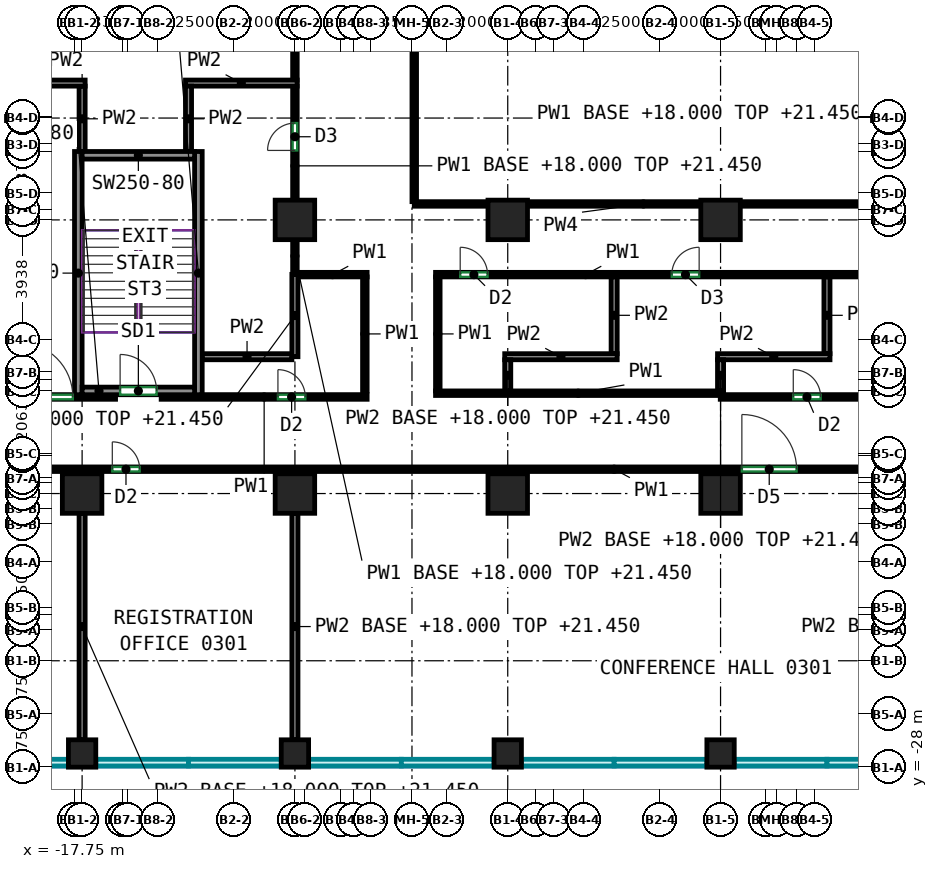
"""IFC4 building model, lengths in metres.
Left out: names, types, materials, properties, quantities, classifications, styles, units other than length and angle.
Written with IfcOpenShell. Run it as: python <this file> out.ifc"""

import sys

from ifc_helpers import new_model, si_unit, direction, frame, frame_2d, origin, origin_2d, place, context, subcontext, project, spatial, rectangle, extrude, source, transform, mapped, element, fill, save


model = new_model("IFC4")
c1 = context("Model", 3, precision=1e-05, world=origin(), true_north=direction((0.0, 1.0)))
c2 = subcontext(c1, "Body", "Model", "MODEL_VIEW")
j1 = project(units=[si_unit("LENGTHUNIT", "METRE"), si_unit("PLANEANGLEUNIT", "RADIAN")], contexts=[c1])
p1 = place(None, origin())
s1 = spatial("IfcSite", under=j1, at=p1, CompositionType="ELEMENT")
p2 = place(p1, origin())
s2 = spatial("IfcBuilding", under=s1, at=p2, CompositionType="ELEMENT")
p3 = place(p2, frame((0.0, 0.0, 18.0)))
s3 = spatial("IfcBuildingStorey", under=s2, at=p3, CompositionType="ELEMENT", Elevation=18.0)
m1 = source(origin(), c2, "Body", "SweptSolid", [
    extrude(rectangle(XDim=0.9, YDim=0.9, at=origin_2d()), origin(), (0.0, 0.0, 1.0), 4.1),
])
p4 = place(p3, frame((-17.5, -27.55, 0.0), z_axis=(0.0, 0.0, 1.0), x_axis=(1.0, 0.0, 0.0)))
e1 = element("IfcColumn", 1, at=p4, inside=s3, PredefinedType="COLUMN", context=c2, shape_type="MappedRepresentation", body=[
    mapped(m1, transform((0.0, 0.0, 0.0))),
])
m2 = source(origin(), c2, "Body", "SweptSolid", [
    extrude(rectangle(XDim=1.3, YDim=1.3, at=origin_2d()), origin(), (0.0, 0.0, 1.0), 4.1),
])
p5 = place(p3, frame((-17.5, -19.0, 0.0), z_axis=(0.0, 0.0, 1.0), x_axis=(1.0, 0.0, 0.0)))
e2 = element("IfcColumn", 2, at=p5, inside=s3, PredefinedType="COLUMN", context=c2, shape_type="MappedRepresentation", body=[
    mapped(m2, transform((0.0, 0.0, 0.0))),
])
p6 = place(p3, frame((-10.5, -27.55, 0.0), z_axis=(0.0, 0.0, 1.0), x_axis=(1.0, 0.0, 0.0)))
e3 = element("IfcColumn", 3, at=p6, inside=s3, PredefinedType="COLUMN", context=c2, shape_type="MappedRepresentation", body=[
    mapped(m1, transform((0.0, 0.0, 0.0))),
])
for number, where, z_axis, x_axis in (
    (4, (-10.5, -19.0, 0.0), (0.0, 0.0, 1.0), (1.0, 0.0, 0.0)),
    (5, (-10.5, -10.0, 0.0), (0.0, 0.0, 1.0), (1.0, 0.0, 0.0)),
):
    element("IfcColumn", number, at=place(p3, frame(where, z_axis=z_axis, x_axis=x_axis)), inside=s3, PredefinedType="COLUMN", context=c2, shape_type="MappedRepresentation", body=[
        mapped(m2, transform((0.0, 0.0, 0.0))),
    ])
p7 = place(p3, frame((-3.5, -27.55, 0.0), z_axis=(0.0, 0.0, 1.0), x_axis=(1.0, 0.0, 0.0)))
e6 = element("IfcColumn", 6, at=p7, inside=s3, PredefinedType="COLUMN", context=c2, shape_type="MappedRepresentation", body=[
    mapped(m1, transform((0.0, 0.0, 0.0))),
])
for number, where, z_axis, x_axis in (
    (7, (-3.5, -19.0, 0.0), (0.0, 0.0, 1.0), (1.0, 0.0, 0.0)),
    (8, (-3.5, -10.0, 0.0), (0.0, 0.0, 1.0), (1.0, 0.0, 0.0)),
):
    element("IfcColumn", number, at=place(p3, frame(where, z_axis=z_axis, x_axis=x_axis)), inside=s3, PredefinedType="COLUMN", context=c2, shape_type="MappedRepresentation", body=[
        mapped(m2, transform((0.0, 0.0, 0.0))),
    ])
p8 = place(p3, frame((3.5, -27.55, 0.0), z_axis=(0.0, 0.0, 1.0), x_axis=(1.0, 0.0, 0.0)))
e9 = element("IfcColumn", 9, at=p8, inside=s3, PredefinedType="COLUMN", context=c2, shape_type="MappedRepresentation", body=[
    mapped(m1, transform((0.0, 0.0, 0.0))),
])
for number, where, z_axis, x_axis in (
    (10, (3.5, -19.0, 0.0), (0.0, 0.0, 1.0), (1.0, 0.0, 0.0)),
    (11, (3.5, -10.0, 0.0), (0.0, 0.0, 1.0), (1.0, 0.0, 0.0)),
):
    element("IfcColumn", number, at=place(p3, frame(where, z_axis=z_axis, x_axis=x_axis)), inside=s3, PredefinedType="COLUMN", context=c2, shape_type="MappedRepresentation", body=[
        mapped(m2, transform((0.0, 0.0, 0.0))),
    ])
m3 = source(origin(), c2, "Body", "SweptSolid", [
    extrude(rectangle(XDim=8.0, YDim=0.25, at=frame_2d((4.0, 0.0))), origin(), (0.0, 0.0, 1.0), 4.1),
])
for number, where, z_axis, x_axis in (
    (12, (-17.625, -15.75, 0.0), (0.0, 0.0, 1.0), (0.0, 1.0, 0.0)),
    (13, (-13.675, -15.75, 0.0), (0.0, 0.0, 1.0), (0.0, 1.0, 0.0)),
):
    element("IfcWall", number, at=place(p3, frame(where, z_axis=z_axis, x_axis=x_axis)), inside=s3, PredefinedType="SHEAR", context=c2, shape_type="MappedRepresentation", body=[
        mapped(m3, transform((0.0, 0.0, 0.0))),
    ])
m4 = source(origin(), c2, "Body", "SweptSolid", [
    extrude(rectangle(XDim=3.7, YDim=0.25, at=frame_2d((1.85, 0.0))), origin(), (0.0, 0.0, 1.0), 4.1),
])
p9 = place(p3, frame((-17.5, -15.625, 0.0), z_axis=(0.0, 0.0, 1.0), x_axis=(1.0, 0.0, 0.0)))
e14 = element("IfcWall", 14, at=p9, inside=s3, PredefinedType="SHEAR", context=c2, shape_type="MappedRepresentation", body=[
    mapped(m4, transform((0.0, 0.0, 0.0))),
])
p10 = place(p9, frame((1.25, 0.0, 0.0)))
e15 = element("IfcOpeningElement", 15, at=p10, cuts=e14, PredefinedType="OPENING", context=c2, shape_type="SweptSolid", body=[
    extrude(rectangle(XDim=1.2, YDim=2.1, at=frame_2d((0.6, 1.05))), frame((0.0, 0.135, 0.0), z_axis=(0.0, -1.0, 0.0), x_axis=(1.0, 0.0, 0.0)), (0.0, 0.0, 1.0), 0.27),
])
p11 = place(p3, frame((-17.5, -7.875, 0.0), z_axis=(0.0, 0.0, 1.0), x_axis=(1.0, 0.0, 0.0)))
e16 = element("IfcWall", 16, at=p11, inside=s3, PredefinedType="SHEAR", context=c2, shape_type="MappedRepresentation", body=[
    mapped(m4, transform((0.0, 0.0, 0.0))),
])
p12 = place(p3, frame((-10.5, -5.41, 0.0), z_axis=(0.0, 0.0, 1.0), x_axis=(0.0, 1.0, 0.0)))
e17 = element("IfcWall", 17, at=p12, inside=s3, PredefinedType="PARTITIONING", context=c2, shape_type="SweptSolid", body=[
    extrude(rectangle(XDim=3.76, YDim=0.15, at=frame_2d((1.88, 0.0))), origin(), (0.0, 0.0, 1.0), 3.45),
])
p13 = place(p3, frame((-24.325, -18.2, 0.0), z_axis=(0.0, 0.0, 1.0), x_axis=(1.0, 0.0, 0.0)))
e18 = element("IfcWall", 18, at=p13, inside=s3, PredefinedType="PARTITIONING", context=c2, shape_type="SweptSolid", body=[
    extrude(rectangle(XDim=48.65, YDim=0.15, at=frame_2d((24.325, 0.0))), origin(), (0.0, 0.0, 1.0), 4.1),
])
p14 = place(p13, frame((7.818, 0.0, 0.0)))
e19 = element("IfcOpeningElement", 19, at=p14, cuts=e18, PredefinedType="OPENING", context=c2, shape_type="SweptSolid", body=[
    extrude(rectangle(XDim=0.9, YDim=2.1, at=frame_2d((0.45, 1.05))), frame((0.0, 0.085, 0.0), z_axis=(0.0, -1.0, 0.0), x_axis=(1.0, 0.0, 0.0)), (0.0, 0.0, 1.0), 0.17),
])
p15 = place(p13, frame((28.526, 0.0, 0.0)))
e20 = element("IfcOpeningElement", 20, at=p15, cuts=e18, PredefinedType="OPENING", context=c2, shape_type="SweptSolid", body=[
    extrude(rectangle(XDim=1.8, YDim=2.1, at=frame_2d((0.9, 1.05))), frame((0.0, 0.085, 0.0), z_axis=(0.0, -1.0, 0.0), x_axis=(1.0, 0.0, 0.0)), (0.0, 0.0, 1.0), 0.17),
])
p16 = place(p13, frame((44.531, 0.0, 0.0)))
e21 = element("IfcOpeningElement", 21, at=p16, cuts=e18, PredefinedType="OPENING", context=c2, shape_type="SweptSolid", body=[
    extrude(rectangle(XDim=0.9, YDim=2.1, at=frame_2d((0.45, 1.05))), frame((0.0, 0.085, 0.0), z_axis=(0.0, -1.0, 0.0), x_axis=(1.0, 0.0, 0.0)), (0.0, 0.0, 1.0), 0.17),
])
p17 = place(p3, frame((-14.9, -15.825, 0.0), z_axis=(0.0, 0.0, 1.0), x_axis=(1.0, 0.0, 0.0)))
e22 = element("IfcWall", 22, at=p17, inside=s3, PredefinedType="PARTITIONING", context=c2, shape_type="SweptSolid", body=[
    extrude(rectangle(XDim=6.775, YDim=0.15, at=frame_2d((3.387, 0.0))), origin(), (0.0, 0.0, 1.0), 4.1),
])
p18 = place(p17, frame((3.841, 0.0, 0.0)))
e23 = element("IfcOpeningElement", 23, at=p18, cuts=e22, PredefinedType="OPENING", context=c2, shape_type="SweptSolid", body=[
    extrude(rectangle(XDim=0.9, YDim=2.1, at=frame_2d((0.45, 1.05))), frame((0.0, 0.085, 0.0), z_axis=(0.0, -1.0, 0.0), x_axis=(1.0, 0.0, 0.0)), (0.0, 0.0, 1.0), 0.17),
])
p19 = place(p3, frame((-24.325, -15.825, 0.0), z_axis=(0.0, 0.0, 1.0), x_axis=(1.0, 0.0, 0.0)))
e24 = element("IfcWall", 24, at=p19, inside=s3, PredefinedType="PARTITIONING", context=c2, shape_type="SweptSolid", body=[
    extrude(rectangle(XDim=7.925, YDim=0.15, at=frame_2d((3.962, 0.0))), origin(), (0.0, 0.0, 1.0), 4.1),
])
p20 = place(p19, frame((4.72, 0.0, 0.0)))
e25 = element("IfcOpeningElement", 25, at=p20, cuts=e24, PredefinedType="OPENING", context=c2, shape_type="SweptSolid", body=[
    extrude(rectangle(XDim=1.8, YDim=2.1, at=frame_2d((0.9, 1.05))), frame((0.0, 0.085, 0.0), z_axis=(0.0, -1.0, 0.0), x_axis=(1.0, 0.0, 0.0)), (0.0, 0.0, 1.0), 0.17),
])
p21 = place(p3, frame((-10.5, -11.725, 0.0), z_axis=(0.0, 0.0, 1.0), x_axis=(0.0, 1.0, 0.0)))
e26 = element("IfcWall", 26, at=p21, inside=s3, PredefinedType="PARTITIONING", context=c2, shape_type="SweptSolid", body=[
    extrude(rectangle(XDim=1.075, YDim=0.15, at=frame_2d((0.538, 0.0))), origin(), (0.0, 0.0, 1.0), 3.45),
])
p22 = place(p3, frame((-10.5, -9.35, 0.0), z_axis=(0.0, 0.0, 1.0), x_axis=(0.0, 1.0, 0.0)))
e27 = element("IfcWall", 27, at=p22, inside=s3, PredefinedType="PARTITIONING", context=c2, shape_type="SweptSolid", body=[
    extrude(rectangle(XDim=3.76, YDim=0.15, at=frame_2d((1.88, 0.0))), origin(), (0.0, 0.0, 1.0), 3.45),
])
p23 = place(p22, frame((1.635, 0.0, 0.0)))
e28 = element("IfcOpeningElement", 28, at=p23, cuts=e27, PredefinedType="OPENING", context=c2, shape_type="SweptSolid", body=[
    extrude(rectangle(XDim=0.9, YDim=2.1, at=frame_2d((0.45, 1.05))), frame((0.0, 0.085, 0.0), z_axis=(0.0, -1.0, 0.0), x_axis=(1.0, 0.0, 0.0)), (0.0, 0.0, 1.0), 0.17),
])
p24 = place(p3, frame((-8.2, -11.875, 0.0), z_axis=(0.0, 0.0, 1.0), x_axis=(0.0, -1.0, 0.0)))
e29 = element("IfcWall", 29, at=p24, inside=s3, PredefinedType="PARTITIONING", context=c2, shape_type="SweptSolid", body=[
    extrude(rectangle(XDim=3.75, YDim=0.15, at=frame_2d((1.875, 0.0))), origin(), (0.0, 0.0, 1.0), 4.1),
])
p25 = place(p3, frame((-10.401, -11.8, 0.0), z_axis=(0.0, 0.0, 1.0), x_axis=(1.0, 0.0, 0.0)))
e30 = element("IfcWall", 30, at=p25, inside=s3, PredefinedType="PARTITIONING", context=c2, shape_type="SweptSolid", body=[
    extrude(rectangle(XDim=2.276, YDim=0.15, at=frame_2d((1.138, 0.0))), origin(), (0.0, 0.0, 1.0), 4.1),
])
p26 = place(p3, frame((-5.875, -11.8, 0.0), z_axis=(0.0, 0.0, 1.0), x_axis=(1.0, 0.0, 0.0)))
e31 = element("IfcWall", 31, at=p26, inside=s3, PredefinedType="PARTITIONING", context=c2, shape_type="SweptSolid", body=[
    extrude(rectangle(XDim=16.45, YDim=0.15, at=frame_2d((8.225, 0.0))), origin(), (0.0, 0.0, 1.0), 4.1),
])
p27 = place(p26, frame((0.811, 0.0, 0.0)))
e32 = element("IfcOpeningElement", 32, at=p27, cuts=e31, PredefinedType="OPENING", context=c2, shape_type="SweptSolid", body=[
    extrude(rectangle(XDim=0.9, YDim=2.1, at=frame_2d((0.45, 1.05))), frame((0.0, 0.085, 0.0), z_axis=(0.0, -1.0, 0.0), x_axis=(1.0, 0.0, 0.0)), (0.0, 0.0, 1.0), 0.17),
])
p28 = place(p26, frame((7.771, 0.0, 0.0)))
e33 = element("IfcOpeningElement", 33, at=p28, cuts=e31, PredefinedType="OPENING", context=c2, shape_type="SweptSolid", body=[
    extrude(rectangle(XDim=0.9, YDim=2.1, at=frame_2d((0.45, 1.05))), frame((0.0, 0.085, 0.0), z_axis=(0.0, -1.0, 0.0), x_axis=(1.0, 0.0, 0.0)), (0.0, 0.0, 1.0), 0.17),
])
p29 = place(p3, frame((-5.8, -15.625, 0.0), z_axis=(0.0, 0.0, 1.0), x_axis=(0.0, 1.0, 0.0)))
e34 = element("IfcWall", 34, at=p29, inside=s3, PredefinedType="PARTITIONING", context=c2, shape_type="SweptSolid", body=[
    extrude(rectangle(XDim=3.75, YDim=0.15, at=frame_2d((1.875, 0.0))), origin(), (0.0, 0.0, 1.0), 4.1),
])
p30 = place(p3, frame((-5.875, -15.7, 0.0), z_axis=(0.0, 0.0, 1.0), x_axis=(1.0, 0.0, 0.0)))
e35 = element("IfcWall", 35, at=p30, inside=s3, PredefinedType="PARTITIONING", context=c2, shape_type="SweptSolid", body=[
    extrude(rectangle(XDim=9.385, YDim=0.15, at=frame_2d((4.692, 0.0))), origin(), (0.0, 0.0, 1.0), 4.1),
])
p31 = place(p3, frame((3.49, -15.825, 0.0), z_axis=(0.0, 0.0, 1.0), x_axis=(1.0, 0.0, 0.0)))
e36 = element("IfcWall", 36, at=p31, inside=s3, PredefinedType="PARTITIONING", context=c2, shape_type="SweptSolid", body=[
    extrude(rectangle(XDim=20.835, YDim=0.15, at=frame_2d((10.417, 0.0))), origin(), (0.0, 0.0, 1.0), 4.1),
])
p32 = place(p31, frame((2.402, 0.0, 0.0)))
e37 = element("IfcOpeningElement", 37, at=p32, cuts=e36, PredefinedType="OPENING", context=c2, shape_type="SweptSolid", body=[
    extrude(rectangle(XDim=0.9, YDim=2.1, at=frame_2d((0.45, 1.05))), frame((0.0, 0.085, 0.0), z_axis=(0.0, -1.0, 0.0), x_axis=(1.0, 0.0, 0.0)), (0.0, 0.0, 1.0), 0.17),
])
p33 = place(p3, frame((-10.5, -19.65, 0.0), z_axis=(0.0, 0.0, 1.0), x_axis=(0.0, -1.0, 0.0)))
e38 = element("IfcWall", 38, at=p33, inside=s3, PredefinedType="PARTITIONING", context=c2, shape_type="SweptSolid", body=[
    extrude(rectangle(XDim=7.45, YDim=0.2, at=frame_2d((3.725, 0.0))), origin(), (0.0, 0.0, 1.0), 3.45),
])
p34 = place(p3, frame((-17.5, -7.75, 0.0), z_axis=(0.0, 0.0, 1.0), x_axis=(0.0, 1.0, 0.0)))
e39 = element("IfcWall", 39, at=p34, inside=s3, PredefinedType="PARTITIONING", context=c2, shape_type="SweptSolid", body=[
    extrude(rectangle(XDim=2.15, YDim=0.2, at=frame_2d((1.075, 0.0))), origin(), (0.0, 0.0, 1.0), 4.1),
])
p35 = place(p3, frame((-21.1, -5.5, 0.0), z_axis=(0.0, 0.0, 1.0), x_axis=(1.0, 0.0, 0.0)))
e40 = element("IfcWall", 40, at=p35, inside=s3, PredefinedType="PARTITIONING", context=c2, shape_type="SweptSolid", body=[
    extrude(rectangle(XDim=3.7, YDim=0.2, at=frame_2d((1.85, 0.0))), origin(), (0.0, 0.0, 1.0), 4.1),
])
p36 = place(p3, frame((-14.1, -5.5, 0.0), z_axis=(0.0, 0.0, 1.0), x_axis=(1.0, 0.0, 0.0)))
e41 = element("IfcWall", 41, at=p36, inside=s3, PredefinedType="PARTITIONING", context=c2, shape_type="SweptSolid", body=[
    extrude(rectangle(XDim=3.674, YDim=0.2, at=frame_2d((1.837, 0.0))), origin(), (0.0, 0.0, 1.0), 4.1),
])
p37 = place(p3, frame((-14.0, -7.75, 0.0), z_axis=(0.0, 0.0, 1.0), x_axis=(0.0, 1.0, 0.0)))
e42 = element("IfcWall", 42, at=p37, inside=s3, PredefinedType="PARTITIONING", context=c2, shape_type="SweptSolid", body=[
    extrude(rectangle(XDim=2.15, YDim=0.2, at=frame_2d((1.075, 0.0))), origin(), (0.0, 0.0, 1.0), 4.1),
])
p38 = place(p3, frame((-17.5, -27.1, 0.0), z_axis=(0.0, 0.0, 1.0), x_axis=(0.0, 1.0, 0.0)))
e43 = element("IfcWall", 43, at=p38, inside=s3, PredefinedType="PARTITIONING", context=c2, shape_type="SweptSolid", body=[
    extrude(rectangle(XDim=7.45, YDim=0.2, at=frame_2d((3.725, 0.0))), origin(), (0.0, 0.0, 1.0), 3.45),
])
p39 = place(p3, frame((-13.55, -14.5, 0.0), z_axis=(0.0, 0.0, 1.0), x_axis=(1.0, 0.0, 0.0)))
e44 = element("IfcWall", 44, at=p39, inside=s3, PredefinedType="PARTITIONING", context=c2, shape_type="SweptSolid", body=[
    extrude(rectangle(XDim=2.95, YDim=0.2, at=frame_2d((1.475, 0.0))), origin(), (0.0, 0.0, 1.0), 4.1),
])
p40 = place(p3, frame((-10.5, -14.5, 0.0), z_axis=(0.0, 0.0, 1.0), x_axis=(-0.000360490243, 0.999999935023, 0.0)))
e45 = element("IfcWall", 45, at=p40, inside=s3, PredefinedType="PARTITIONING", context=c2, shape_type="SweptSolid", body=[
    extrude(rectangle(XDim=2.709, YDim=0.2, at=frame_2d((1.354, 0.0))), origin(), (0.0, 0.0, 1.0), 3.45),
])
p41 = place(p3, frame((0.0, -14.4, 0.0), z_axis=(0.0, 0.0, 1.0), x_axis=(0.0, 1.0, 0.0)))
e46 = element("IfcWall", 46, at=p41, inside=s3, PredefinedType="PARTITIONING", context=c2, shape_type="SweptSolid", body=[
    extrude(rectangle(XDim=2.524, YDim=0.2, at=frame_2d((1.262, 0.0))), origin(), (0.0, 0.0, 1.0), 4.1),
])
p42 = place(p3, frame((-3.6, -14.5, 0.0), z_axis=(0.0, 0.0, 1.0), x_axis=(1.0, 0.0, 0.0)))
e47 = element("IfcWall", 47, at=p42, inside=s3, PredefinedType="PARTITIONING", context=c2, shape_type="SweptSolid", body=[
    extrude(rectangle(XDim=3.7, YDim=0.2, at=frame_2d((1.85, 0.0))), origin(), (0.0, 0.0, 1.0), 4.1),
])
p43 = place(p3, frame((-3.5, -15.624, 0.0), z_axis=(0.0, 0.0, 1.0), x_axis=(0.0, 1.0, 0.0)))
e48 = element("IfcWall", 48, at=p43, inside=s3, PredefinedType="PARTITIONING", context=c2, shape_type="SweptSolid", body=[
    extrude(rectangle(XDim=1.024, YDim=0.2, at=frame_2d((0.512, 0.0))), origin(), (0.0, 0.0, 1.0), 3.45),
])
p44 = place(p3, frame((7.0, -14.4, 0.0), z_axis=(0.0, 0.0, 1.0), x_axis=(0.0, 1.0, 0.0)))
e49 = element("IfcWall", 49, at=p44, inside=s3, PredefinedType="PARTITIONING", context=c2, shape_type="SweptSolid", body=[
    extrude(rectangle(XDim=2.524, YDim=0.2, at=frame_2d((1.262, 0.0))), origin(), (0.0, 0.0, 1.0), 4.1),
])
p45 = place(p3, frame((3.4, -14.5, 0.0), z_axis=(0.0, 0.0, 1.0), x_axis=(1.0, 0.0, 0.0)))
e50 = element("IfcWall", 50, at=p45, inside=s3, PredefinedType="PARTITIONING", context=c2, shape_type="SweptSolid", body=[
    extrude(rectangle(XDim=3.7, YDim=0.2, at=frame_2d((1.85, 0.0))), origin(), (0.0, 0.0, 1.0), 4.1),
])
p46 = place(p3, frame((3.5, -15.624, 0.0), z_axis=(0.0, 0.0, 1.0), x_axis=(0.0, 1.0, 0.0)))
e51 = element("IfcWall", 51, at=p46, inside=s3, PredefinedType="PARTITIONING", context=c2, shape_type="SweptSolid", body=[
    extrude(rectangle(XDim=1.024, YDim=0.2, at=frame_2d((0.512, 0.0))), origin(), (0.0, 0.0, 1.0), 3.45),
])
p47 = place(p3, frame((8.5, -9.475, 0.0), z_axis=(0.0, 0.0, 1.0), x_axis=(-1.0, 0.0, 0.0)))
e52 = element("IfcWall", 52, at=p47, inside=s3, PredefinedType="PARTITIONING", context=c2, shape_type="SweptSolid", body=[
    extrude(rectangle(XDim=15.075, YDim=0.15, at=frame_2d((7.538, 0.0))), origin(), (0.0, 0.0, 1.0), 4.1),
])
p48 = place(p3, frame((-6.575, -9.4, 0.0), z_axis=(0.0, 0.0, 1.0), x_axis=(0.0, 1.0, 0.0)))
e53 = element("IfcWall", 53, at=p48, inside=s3, PredefinedType="PARTITIONING", context=c2, shape_type="SweptSolid", body=[
    extrude(rectangle(XDim=15.0, YDim=0.15, at=frame_2d((7.5, 0.0))), origin(), (0.0, 0.0, 1.0), 4.1),
])
p49 = place(p10, origin())
e54 = element("IfcDoor", 54, at=p49, inside=s3, OperationType="DOUBLE_DOOR_SINGLE_SWING", PredefinedType="DOOR", context=c2, shape_type="SweptSolid", body=[
    extrude(rectangle(XDim=1.2, YDim=2.1, at=frame_2d((0.6, 1.05))), frame((0.0, 0.025, 0.0), z_axis=(0.0, -1.0, 0.0), x_axis=(1.0, 0.0, 0.0)), (0.0, 0.0, 1.0), 0.05),
])
fill(e15, e54)
p50 = place(p14, origin())
e55 = element("IfcDoor", 55, at=p50, inside=s3, OperationType="SINGLE_SWING_LEFT", PredefinedType="DOOR", context=c2, shape_type="SweptSolid", body=[
    extrude(rectangle(XDim=0.9, YDim=2.1, at=frame_2d((0.45, 1.05))), frame((0.0, 0.025, 0.0), z_axis=(0.0, -1.0, 0.0), x_axis=(1.0, 0.0, 0.0)), (0.0, 0.0, 1.0), 0.05),
])
fill(e19, e55)
p51 = place(p15, origin())
e56 = element("IfcDoor", 56, at=p51, inside=s3, OperationType="DOUBLE_DOOR_SINGLE_SWING", PredefinedType="DOOR", context=c2, shape_type="SweptSolid", body=[
    extrude(rectangle(XDim=1.8, YDim=2.1, at=frame_2d((0.9, 1.05))), frame((0.0, 0.025, 0.0), z_axis=(0.0, -1.0, 0.0), x_axis=(1.0, 0.0, 0.0)), (0.0, 0.0, 1.0), 0.05),
])
fill(e20, e56)
p52 = place(p20, origin())
e57 = element("IfcDoor", 57, at=p52, inside=s3, OperationType="DOUBLE_DOOR_SINGLE_SWING", PredefinedType="DOOR", context=c2, shape_type="SweptSolid", body=[
    extrude(rectangle(XDim=1.8, YDim=2.1, at=frame_2d((0.9, 1.05))), frame((0.0, 0.025, 0.0), z_axis=(0.0, -1.0, 0.0), x_axis=(1.0, 0.0, 0.0)), (0.0, 0.0, 1.0), 0.05),
])
fill(e25, e57)
p53 = place(p18, origin())
e58 = element("IfcDoor", 58, at=p53, inside=s3, OperationType="SINGLE_SWING_LEFT", PredefinedType="DOOR", context=c2, shape_type="SweptSolid", body=[
    extrude(rectangle(XDim=0.9, YDim=2.1, at=frame_2d((0.45, 1.05))), frame((0.0, 0.025, 0.0), z_axis=(0.0, -1.0, 0.0), x_axis=(1.0, 0.0, 0.0)), (0.0, 0.0, 1.0), 0.05),
])
fill(e23, e58)
p54 = place(p32, origin())
e59 = element("IfcDoor", 59, at=p54, inside=s3, OperationType="SINGLE_SWING_LEFT", PredefinedType="DOOR", context=c2, shape_type="SweptSolid", body=[
    extrude(rectangle(XDim=0.9, YDim=2.1, at=frame_2d((0.45, 1.05))), frame((0.0, 0.025, 0.0), z_axis=(0.0, -1.0, 0.0), x_axis=(1.0, 0.0, 0.0)), (0.0, 0.0, 1.0), 0.05),
])
fill(e37, e59)
p55 = place(p27, origin())
e60 = element("IfcDoor", 60, at=p55, inside=s3, OperationType="SINGLE_SWING_LEFT", PredefinedType="DOOR", context=c2, shape_type="SweptSolid", body=[
    extrude(rectangle(XDim=0.9, YDim=2.1, at=frame_2d((0.45, 1.05))), frame((0.0, 0.025, 0.0), z_axis=(0.0, -1.0, 0.0), x_axis=(1.0, 0.0, 0.0)), (0.0, 0.0, 1.0), 0.05),
])
fill(e32, e60)
p56 = place(p28, origin())
e61 = element("IfcDoor", 61, at=p56, inside=s3, OperationType="SINGLE_SWING_RIGHT", PredefinedType="DOOR", context=c2, shape_type="SweptSolid", body=[
    extrude(rectangle(XDim=0.9, YDim=2.1, at=frame_2d((0.45, 1.05))), frame((0.0, 0.025, 0.0), z_axis=(0.0, -1.0, 0.0), x_axis=(1.0, 0.0, 0.0)), (0.0, 0.0, 1.0), 0.05),
])
fill(e33, e61)
p57 = place(p23, origin())
e62 = element("IfcDoor", 62, at=p57, inside=s3, OperationType="SINGLE_SWING_LEFT", PredefinedType="DOOR", context=c2, shape_type="SweptSolid", body=[
    extrude(rectangle(XDim=0.9, YDim=2.1, at=frame_2d((0.45, 1.05))), frame((0.0, 0.025, 0.0), z_axis=(0.0, -1.0, 0.0), x_axis=(1.0, 0.0, 0.0)), (0.0, 0.0, 1.0), 0.05),
])
fill(e28, e62)
save(model, sys.argv[1])
